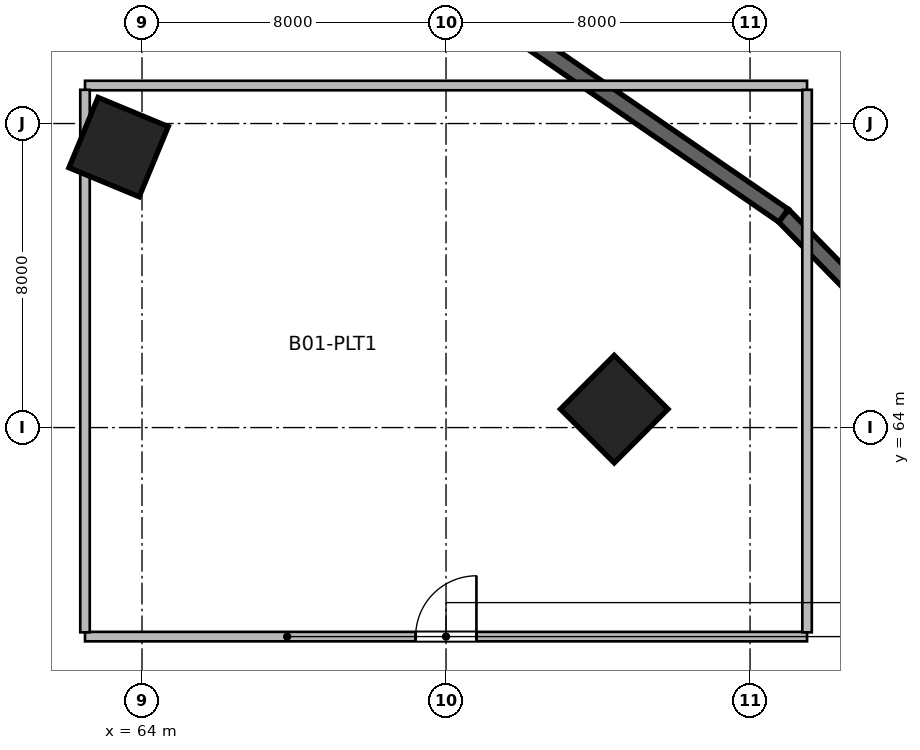
"""IFC4 building model, lengths in metres.
Left out: names, types, materials, properties, quantities, classifications, styles, units other than length and angle.
Written with IfcOpenShell. Run it as: python <this file> out.ifc"""

import sys

from ifc_helpers import new_model, si_unit, direction, frame, frame_2d, origin, origin_2d, place, context, subcontext, project, spatial, rectangle, extrude, source, transform, mapped, element, fill, save


model = new_model("IFC4")
c1 = context("Model", 3, precision=1e-05, world=origin(), true_north=direction((0.0, 1.0)))
c2 = subcontext(c1, "Body", "Model", "MODEL_VIEW")
j1 = project(units=[si_unit("LENGTHUNIT", "METRE"), si_unit("PLANEANGLEUNIT", "RADIAN")], contexts=[c1])
p1 = place(None, origin())
s1 = spatial("IfcSite", under=j1, at=p1, CompositionType="ELEMENT")
p2 = place(p1, origin())
s2 = spatial("IfcBuilding", under=s1, at=p2, CompositionType="ELEMENT")
p3 = place(p2, frame((0.0, 0.0, -5.0)))
s3 = spatial("IfcBuildingStorey", under=s2, at=p3, CompositionType="ELEMENT", Elevation=-5.0)
m1 = source(origin(), c2, "Body", "SweptSolid", [
    extrude(rectangle(XDim=8.268, YDim=0.42, at=frame_2d((4.134, 0.0))), origin(), (0.0, 0.0, 1.0), 5.0),
])
p4 = place(p3, frame((86.663, 63.667, 0.0), z_axis=(0.0, 0.0, 1.0), x_axis=(-0.699373198463, 0.714756692358, 0.0)))
e1 = element("IfcWall", 1, at=p4, inside=s3, PredefinedType="USERDEFINED", context=c2, shape_type="MappedRepresentation", body=[
    mapped(m1, transform((0.0, 0.0, 0.0), scale=1.0)),
])
m2 = source(origin(), c2, "Body", "SweptSolid", [
    extrude(rectangle(XDim=8.554, YDim=0.42, at=frame_2d((4.277, 0.0))), origin(), (0.0, 0.0, 1.0), 5.0),
])
p5 = place(p3, frame((80.881, 69.577, 0.0), z_axis=(0.0, 0.0, 1.0), x_axis=(-0.823739529001, 0.566968419192, 0.0)))
e2 = element("IfcWall", 2, at=p5, inside=s3, PredefinedType="USERDEFINED", context=c2, shape_type="MappedRepresentation", body=[
    mapped(m2, transform((0.0, 0.0, 0.0), scale=1.0)),
])
m3 = source(origin(), c2, "Body", "SweptSolid", [
    extrude(rectangle(XDim=2.0, YDim=2.0, at=origin_2d()), origin(), (0.0, 0.0, 1.0), 5.0),
])
for number, where, z_axis, x_axis in (
    (3, (76.426, 64.486, 0.0), (0.0, 0.0, 1.0), (0.707, 0.707, 0.0)),
    (4, (63.384, 71.379, 0.0), (0.0, 0.0, 1.0), (0.383, 0.924, 0.0)),
):
    element("IfcColumn", number, at=place(p3, frame(where, z_axis=z_axis, x_axis=x_axis)), inside=s3, PredefinedType="COLUMN", context=c2, shape_type="MappedRepresentation", body=[
        mapped(m3, transform((0.0, 0.0, 0.0), scale=1.0)),
    ])
m4 = source(origin(), c2, "Body", "SweptSolid", [
    extrude(rectangle(XDim=19.0, YDim=0.25, at=frame_2d((9.5, 0.0))), origin(), (0.0, 0.0, 1.0), 3.78),
])
p6 = place(p3, frame((62.5, 58.5, 0.0), z_axis=(0.0, 0.0, 1.0), x_axis=(1.0, 0.0, 0.0)))
e5 = element("IfcWall", 5, at=p6, inside=s3, PredefinedType="PARTITIONING", context=c2, shape_type="MappedRepresentation", body=[
    mapped(m4, transform((0.0, 0.0, 0.0), scale=1.0)),
])
p7 = place(p6, frame((8.7, 0.0, 0.0)))
e6 = element("IfcOpeningElement", 6, at=p7, cuts=e5, PredefinedType="OPENING", context=c2, shape_type="SweptSolid", body=[
    extrude(rectangle(XDim=1.6, YDim=2.15, at=frame_2d((0.8, 1.075))), frame((0.0, 0.135, 0.0), z_axis=(0.0, -1.0, 0.0), x_axis=(1.0, 0.0, 0.0)), (0.0, 0.0, 1.0), 0.27),
])
m5 = source(origin(), c2, "Body", "SweptSolid", [
    extrude(rectangle(XDim=19.0, YDim=0.25, at=frame_2d((9.5, 0.0))), origin(), (0.0, 0.0, 1.0), 4.7),
])
p8 = place(p3, frame((62.5, 73.0, 0.0), z_axis=(0.0, 0.0, 1.0), x_axis=(1.0, 0.0, 0.0)))
e7 = element("IfcWall", 7, at=p8, inside=s3, PredefinedType="PARTITIONING", context=c2, shape_type="MappedRepresentation", body=[
    mapped(m5, transform((0.0, 0.0, 0.0), scale=1.0)),
])
m6 = source(origin(), c2, "Body", "SweptSolid", [
    extrude(rectangle(XDim=14.275, YDim=0.25, at=frame_2d((7.137, 0.0))), origin(), (0.0, 0.0, 1.0), 4.7),
])
for number, where, z_axis, x_axis in (
    (8, (62.5, 58.613, 0.0), (0.0, 0.0, 1.0), (0.0, 1.0, 0.0)),
    (9, (81.5, 58.613, 0.0), (0.0, 0.0, 1.0), (0.0, 1.0, 0.0)),
):
    element("IfcWall", number, at=place(p3, frame(where, z_axis=z_axis, x_axis=x_axis)), inside=s3, PredefinedType="PARTITIONING", context=c2, shape_type="MappedRepresentation", body=[
        mapped(m6, transform((0.0, 0.0, 0.0), scale=1.0)),
    ])
m7 = source(origin(), c2, "Body", "SweptSolid", [
    extrude(rectangle(XDim=1.6, YDim=2.15, at=frame_2d((0.8, 1.075))), frame((0.0, 0.025, 0.0), z_axis=(0.0, -1.0, 0.0), x_axis=(1.0, 0.0, 0.0)), (0.0, 0.0, 1.0), 0.05),
])
p9 = place(p7, origin())
e10 = element("IfcDoor", 10, at=p9, inside=s3, OperationType="SINGLE_SWING_RIGHT", PredefinedType="DOOR", context=c2, shape_type="MappedRepresentation", body=[
    mapped(m7, transform((0.0, 0.0, 0.0), scale=1.0)),
])
fill(e6, e10)
save(model, sys.argv[1])
